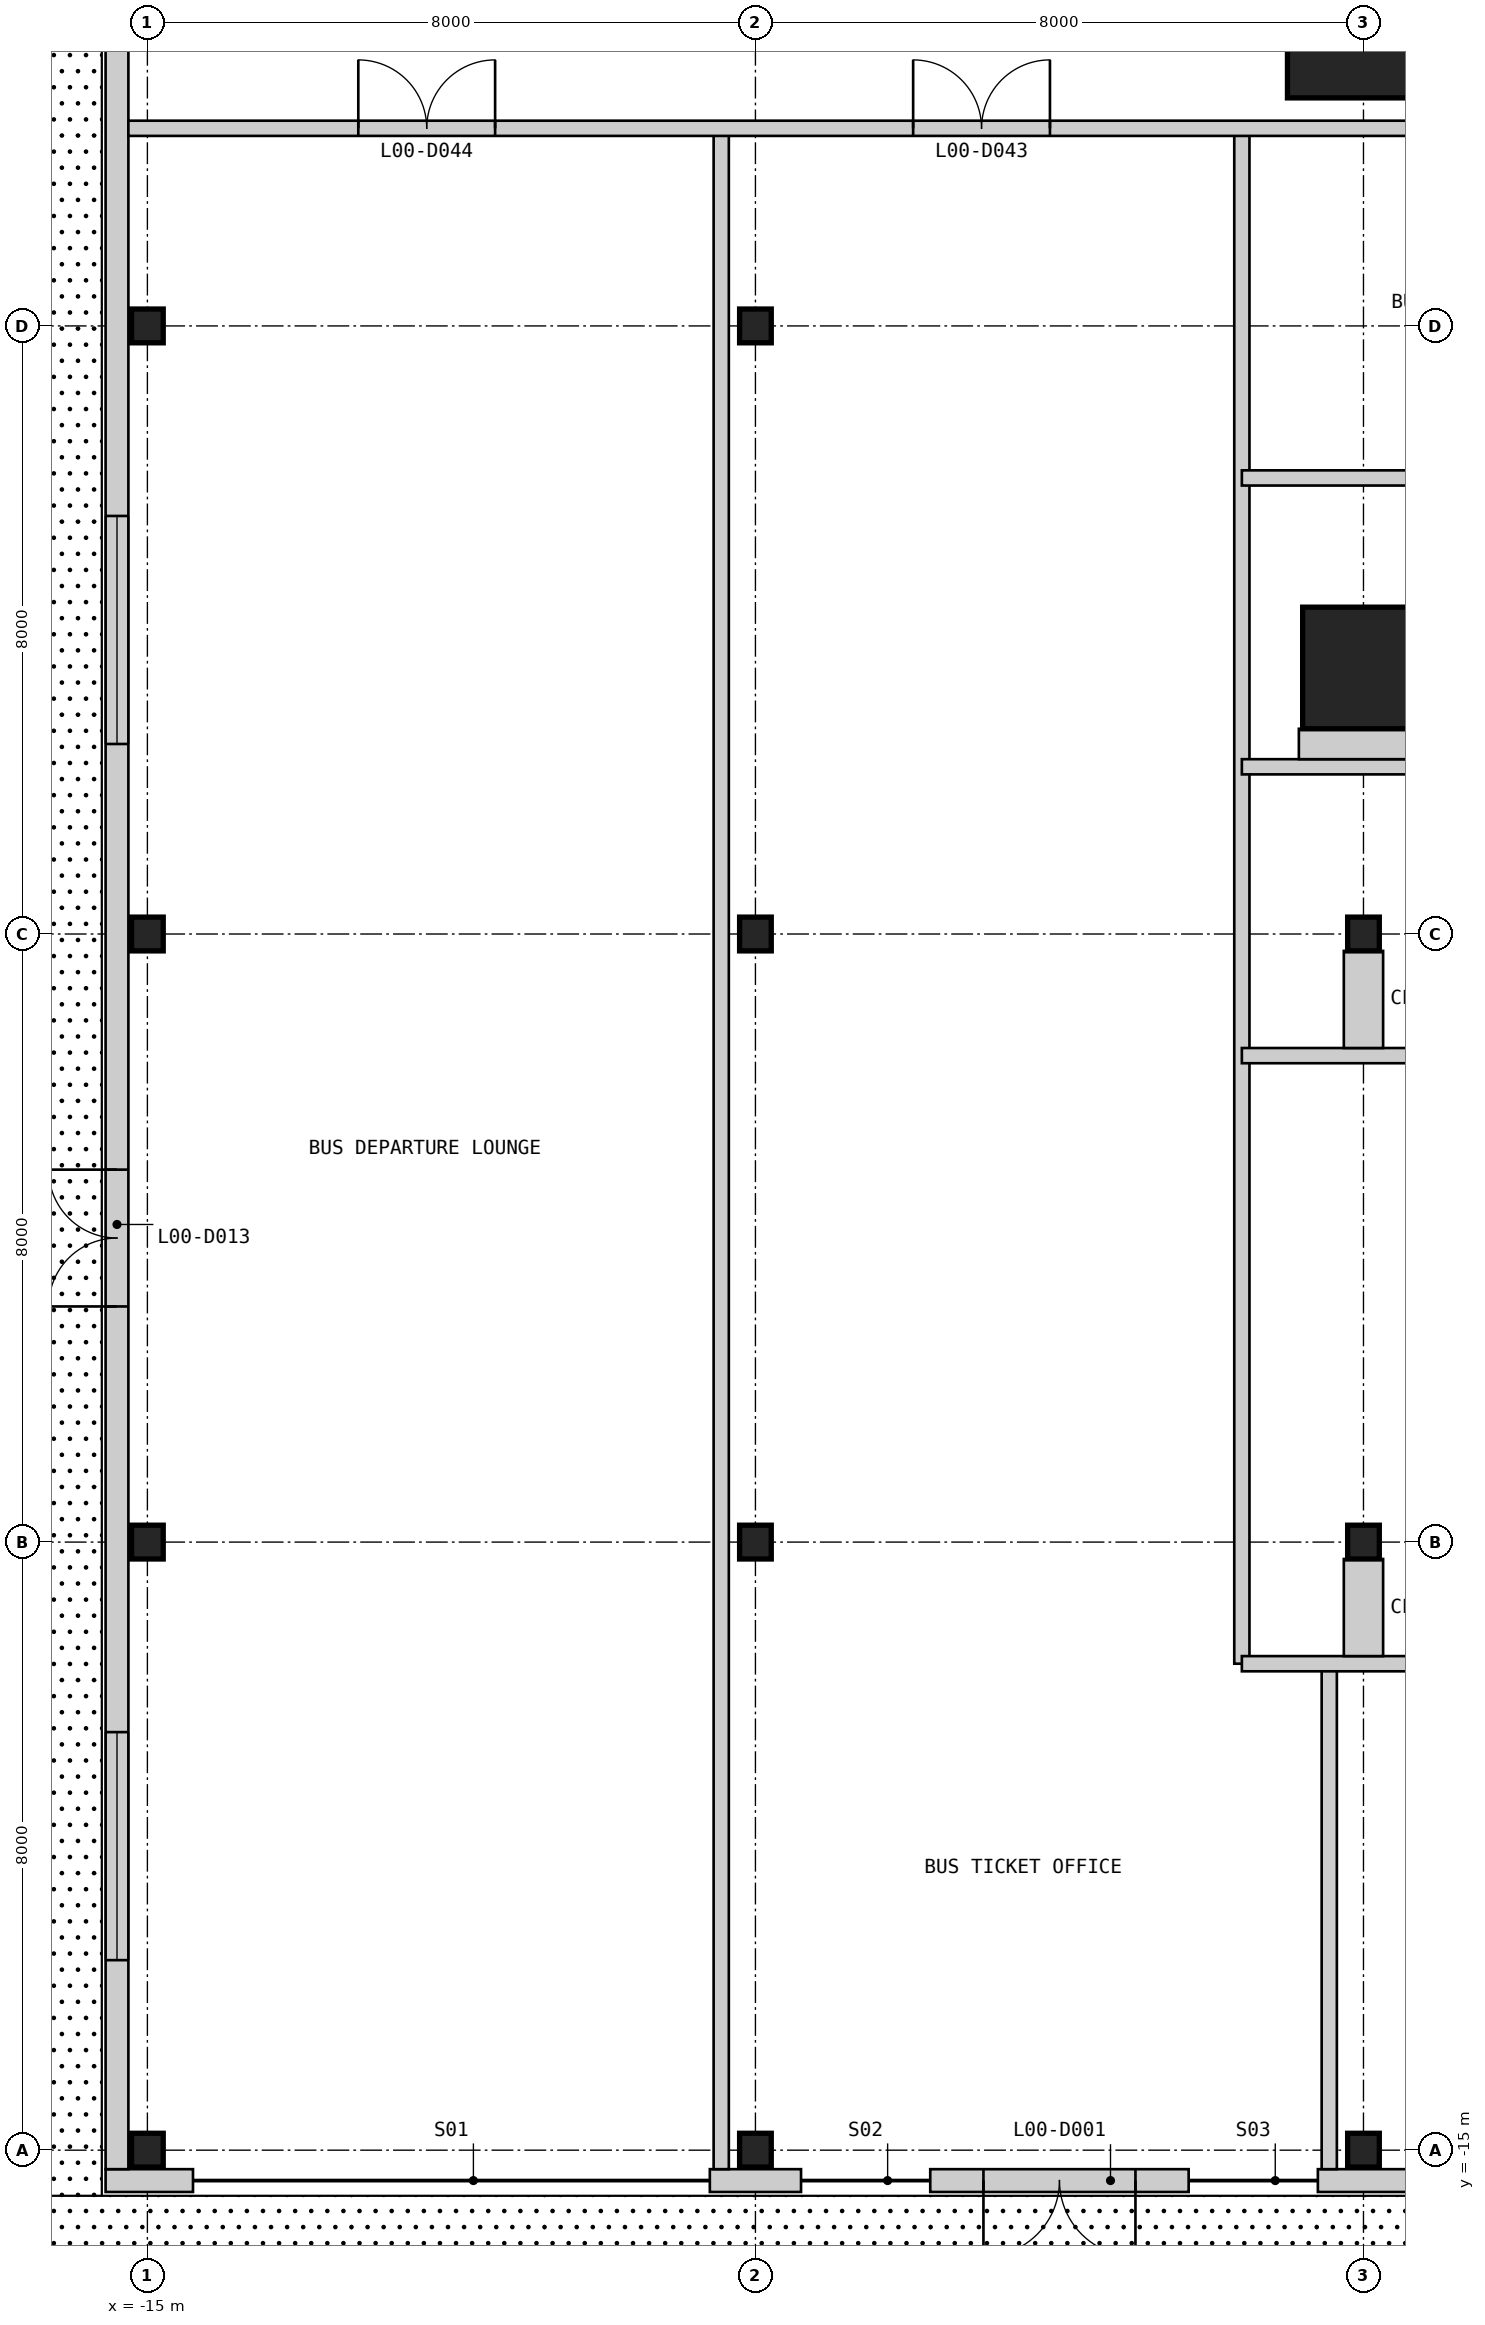
"""IFC4 building model, lengths in metres.
Left out: names, types, materials, properties, quantities, classifications, styles, units other than length and angle.
Written with IfcOpenShell. Run it as: python <this file> out.ifc"""

import sys

from ifc_helpers import new_model, si_unit, direction, frame, frame_2d, origin, origin_2d, place, context, subcontext, project, spatial, rectangle, i_section, extrude, element, fill, save


model = new_model("IFC4")
c1 = context("Model", 3, precision=1e-05, world=origin(), true_north=direction((0.0, 1.0)))
c2 = subcontext(c1, "Body", "Model", "MODEL_VIEW")
j1 = project(units=[si_unit("LENGTHUNIT", "METRE"), si_unit("PLANEANGLEUNIT", "RADIAN")], contexts=[c1])
p1 = place(None, origin())
s1 = spatial("IfcSite", under=j1, at=p1, CompositionType="ELEMENT")
p2 = place(p1, origin())
s2 = spatial("IfcBuilding", under=s1, at=p2, CompositionType="ELEMENT")
p3 = place(p2, origin())
s3 = spatial("IfcBuildingStorey", under=s2, at=p3, CompositionType="ELEMENT", Elevation=0.0)
p4 = place(p3, frame((1.0, 13.0, 0.0), z_axis=(0.0, 0.0, 1.0), x_axis=(1.0, 0.0, 0.0)))
e1 = element("IfcColumn", 1, at=p4, inside=s3, PredefinedType="COLUMN", context=c2, shape_type="SweptSolid", body=[
    extrude(rectangle(XDim=2.0, YDim=2.0, at=origin_2d()), origin(), (0.0, 0.0, 1.0), 7.0),
])
p5 = place(p3, frame((1.0, 4.5, 0.0), z_axis=(0.0, 0.0, 1.0), x_axis=(1.0, 0.0, 0.0)))
e2 = element("IfcColumn", 2, at=p5, inside=s3, PredefinedType="COLUMN", context=c2, shape_type="SweptSolid", body=[
    extrude(rectangle(XDim=1.6, YDim=1.6, at=origin_2d()), origin(), (0.0, 0.0, 1.0), 7.0),
])
for number, where, z_axis, x_axis in (
    (3, (-15.0, -15.0, -0.3), (0.0, 0.0, 1.0), (1.0, 0.0, 0.0)),
    (4, (-15.0, -7.0, -0.3), (0.0, 0.0, 1.0), (1.0, 0.0, 0.0)),
    (5, (-15.0, 1.0, -0.3), (0.0, 0.0, 1.0), (1.0, 0.0, 0.0)),
    (6, (-15.0, 9.0, -0.3), (0.0, 0.0, 1.0), (1.0, 0.0, 0.0)),
    (7, (-7.0, -15.0, -0.3), (0.0, 0.0, 1.0), (1.0, 0.0, 0.0)),
):
    element("IfcColumn", number, at=place(p3, frame(where, z_axis=z_axis, x_axis=x_axis)), inside=s3, PredefinedType="COLUMN", context=c2, shape_type="SweptSolid", body=[
        extrude(i_section(OverallWidth=0.417, OverallDepth=0.445, WebThickness=0.039, FlangeThickness=0.063, at=origin_2d()), origin(), (0.0, 0.0, 1.0), 7.3),
    ])
for number, where, z_axis, x_axis in (
    (8, (-7.0, -7.0, 0.0), (0.0, 0.0, 1.0), (1.0, 0.0, 0.0)),
    (9, (-7.0, 1.0, 0.0), (0.0, 0.0, 1.0), (1.0, 0.0, 0.0)),
    (10, (-7.0, 9.0, 0.0), (0.0, 0.0, 1.0), (1.0, 0.0, 0.0)),
):
    element("IfcColumn", number, at=place(p3, frame(where, z_axis=z_axis, x_axis=x_axis)), inside=s3, PredefinedType="COLUMN", context=c2, shape_type="SweptSolid", body=[
        extrude(i_section(OverallWidth=0.417, OverallDepth=0.445, WebThickness=0.039, FlangeThickness=0.063, at=origin_2d()), origin(), (0.0, 0.0, 1.0), 7.0),
    ])
p6 = place(p3, frame((1.0, -15.0, -0.3), z_axis=(0.0, 0.0, 1.0), x_axis=(1.0, 0.0, 0.0)))
e11 = element("IfcColumn", 11, at=p6, inside=s3, PredefinedType="COLUMN", context=c2, shape_type="SweptSolid", body=[
    extrude(i_section(OverallWidth=0.417, OverallDepth=0.445, WebThickness=0.039, FlangeThickness=0.063, at=origin_2d()), origin(), (0.0, 0.0, 1.0), 7.3),
])
for number, where, z_axis, x_axis in (
    (12, (1.0, -7.0, 0.0), (0.0, 0.0, 1.0), (1.0, 0.0, 0.0)),
    (13, (1.0, 1.0, 0.0), (0.0, 0.0, 1.0), (1.0, 0.0, 0.0)),
):
    element("IfcColumn", number, at=place(p3, frame(where, z_axis=z_axis, x_axis=x_axis)), inside=s3, PredefinedType="COLUMN", context=c2, shape_type="SweptSolid", body=[
        extrude(i_section(OverallWidth=0.417, OverallDepth=0.445, WebThickness=0.039, FlangeThickness=0.063, at=origin_2d()), origin(), (0.0, 0.0, 1.0), 7.0),
    ])
p7 = place(p3, frame((-15.55, -15.4, 0.0), z_axis=(0.0, 0.0, 1.0), x_axis=(1.0, 0.0, 0.0)))
e14 = element("IfcWall", 14, at=p7, inside=s3, PredefinedType="SOLIDWALL", context=c2, shape_type="SweptSolid", body=[
    extrude(rectangle(XDim=1.15, YDim=0.3, at=frame_2d((0.575, 0.0))), origin(), (0.0, 0.0, 1.0), 6.7),
])
p8 = place(p3, frame((-7.6, -15.4, 0.0), z_axis=(0.0, 0.0, 1.0), x_axis=(1.0, 0.0, 0.0)))
e15 = element("IfcWall", 15, at=p8, inside=s3, PredefinedType="SOLIDWALL", context=c2, shape_type="SweptSolid", body=[
    extrude(rectangle(XDim=1.2, YDim=0.3, at=frame_2d((0.6, 0.0))), origin(), (0.0, 0.0, 1.0), 6.7),
])
p9 = place(p3, frame((-4.7, -15.4, 0.0), z_axis=(0.0, 0.0, 1.0), x_axis=(1.0, 0.0, 0.0)))
e16 = element("IfcWall", 16, at=p9, inside=s3, PredefinedType="SOLIDWALL", context=c2, shape_type="SweptSolid", body=[
    extrude(rectangle(XDim=3.4, YDim=0.3, at=frame_2d((1.7, 0.0))), origin(), (0.0, 0.0, 1.0), 6.7),
])
p10 = place(p9, frame((0.7, 0.0, 0.0)))
e17 = element("IfcOpeningElement", 17, at=p10, cuts=e16, PredefinedType="OPENING", context=c2, shape_type="SweptSolid", body=[
    extrude(rectangle(XDim=2.0, YDim=3.0, at=frame_2d((1.0, 1.5))), frame((0.0, 0.16, 0.0), z_axis=(0.0, -1.0, 0.0), x_axis=(1.0, 0.0, 0.0)), (0.0, 0.0, 1.0), 0.32),
])
p11 = place(p3, frame((0.4, -15.4, 0.0), z_axis=(0.0, 0.0, 1.0), x_axis=(1.0, 0.0, 0.0)))
e18 = element("IfcWall", 18, at=p11, inside=s3, PredefinedType="SOLIDWALL", context=c2, shape_type="SweptSolid", body=[
    extrude(rectangle(XDim=1.2, YDim=0.3, at=frame_2d((0.6, 0.0))), origin(), (0.0, 0.0, 1.0), 6.7),
])
p12 = place(p3, frame((-15.4, 65.25, 0.0), z_axis=(0.0, 0.0, 1.0), x_axis=(0.0, -1.0, 0.0)))
e19 = element("IfcWall", 19, at=p12, inside=s3, PredefinedType="SOLIDWALL", context=c2, shape_type="SweptSolid", body=[
    extrude(rectangle(XDim=80.5, YDim=0.3, at=frame_2d((40.25, 0.0))), origin(), (0.0, 0.0, 1.0), 6.7),
])
p13 = place(p12, frame((67.35, 0.0, 0.0)))
e20 = element("IfcOpeningElement", 20, at=p13, cuts=e19, PredefinedType="OPENING", context=c2, shape_type="SweptSolid", body=[
    extrude(rectangle(XDim=1.8, YDim=2.4, at=frame_2d((0.9, 1.2))), frame((0.0, 0.16, 0.0), z_axis=(0.0, -1.0, 0.0), x_axis=(1.0, 0.0, 0.0)), (0.0, 0.0, 1.0), 0.32),
])
p14 = place(p12, frame((45.35, 0.0, 0.0)))
e21 = element("IfcOpeningElement", 21, at=p14, cuts=e19, PredefinedType="OPENING", context=c2, shape_type="SweptSolid", body=[
    extrude(rectangle(XDim=1.8, YDim=2.4, at=frame_2d((0.9, 1.2))), frame((0.0, 0.16, 0.0), z_axis=(0.0, -1.0, 0.0), x_axis=(1.0, 0.0, 0.0)), (0.0, 0.0, 1.0), 0.32),
])
p15 = place(p12, frame((33.35, 0.0, 0.0)))
e22 = element("IfcOpeningElement", 22, at=p15, cuts=e19, PredefinedType="OPENING", context=c2, shape_type="SweptSolid", body=[
    extrude(rectangle(XDim=1.8, YDim=2.4, at=frame_2d((0.9, 1.2))), frame((0.0, 0.16, 0.0), z_axis=(0.0, -1.0, 0.0), x_axis=(1.0, 0.0, 0.0)), (0.0, 0.0, 1.0), 0.32),
])
p16 = place(p12, frame((11.35, 0.0, 0.0)))
e23 = element("IfcOpeningElement", 23, at=p16, cuts=e19, PredefinedType="OPENING", context=c2, shape_type="SweptSolid", body=[
    extrude(rectangle(XDim=1.8, YDim=2.4, at=frame_2d((0.9, 1.2))), frame((0.0, 0.16, 0.0), z_axis=(0.0, -1.0, 0.0), x_axis=(1.0, 0.0, 0.0)), (0.0, 0.0, 1.0), 0.32),
])
p17 = place(p12, frame((74.75, 0.0, 0.9)))
e24 = element("IfcOpeningElement", 24, at=p17, cuts=e19, PredefinedType="OPENING", context=c2, shape_type="SweptSolid", body=[
    extrude(rectangle(XDim=3.0, YDim=2.4, at=frame_2d((1.5, 1.2))), frame((0.0, 0.16, 0.0), z_axis=(0.0, -1.0, 0.0), x_axis=(1.0, 0.0, 0.0)), (0.0, 0.0, 1.0), 0.32),
])
p18 = place(p12, frame((58.75, 0.0, 0.9)))
e25 = element("IfcOpeningElement", 25, at=p18, cuts=e19, PredefinedType="OPENING", context=c2, shape_type="SweptSolid", body=[
    extrude(rectangle(XDim=3.0, YDim=2.4, at=frame_2d((1.5, 1.2))), frame((0.0, 0.16, 0.0), z_axis=(0.0, -1.0, 0.0), x_axis=(1.0, 0.0, 0.0)), (0.0, 0.0, 1.0), 0.32),
])
p19 = place(p12, frame((24.25, 0.0, 0.9)))
e26 = element("IfcOpeningElement", 26, at=p19, cuts=e19, PredefinedType="OPENING", context=c2, shape_type="SweptSolid", body=[
    extrude(rectangle(XDim=3.0, YDim=2.4, at=frame_2d((1.5, 1.2))), frame((0.0, 0.16, 0.0), z_axis=(0.0, -1.0, 0.0), x_axis=(1.0, 0.0, 0.0)), (0.0, 0.0, 1.0), 0.32),
])
p20 = place(p12, frame((18.25, 0.0, 0.9)))
e27 = element("IfcOpeningElement", 27, at=p20, cuts=e19, PredefinedType="OPENING", context=c2, shape_type="SweptSolid", body=[
    extrude(rectangle(XDim=3.0, YDim=2.4, at=frame_2d((1.5, 1.2))), frame((0.0, 0.16, 0.0), z_axis=(0.0, -1.0, 0.0), x_axis=(1.0, 0.0, 0.0)), (0.0, 0.0, 1.0), 0.32),
])
p21 = place(p12, frame((2.75, 0.0, 0.9)))
e28 = element("IfcOpeningElement", 28, at=p21, cuts=e19, PredefinedType="OPENING", context=c2, shape_type="SweptSolid", body=[
    extrude(rectangle(XDim=3.0, YDim=2.4, at=frame_2d((1.5, 1.2))), frame((0.0, 0.16, 0.0), z_axis=(0.0, -1.0, 0.0), x_axis=(1.0, 0.0, 0.0)), (0.0, 0.0, 1.0), 0.32),
])
p22 = place(p3, frame((-7.45, -15.25, 0.0), z_axis=(0.0, 0.0, 1.0), x_axis=(0.0, 1.0, 0.0)))
e29 = element("IfcWall", 29, at=p22, inside=s3, PredefinedType="PARTITIONING", context=c2, shape_type="SweptSolid", body=[
    extrude(rectangle(XDim=26.85, YDim=0.2, at=frame_2d((13.425, 0.0))), origin(), (0.0, 0.0, 1.0), 6.7),
])
p23 = place(p3, frame((-0.6, -8.6, 0.0), z_axis=(0.0, 0.0, 1.0), x_axis=(0.0, 1.0, 0.0)))
e30 = element("IfcWall", 30, at=p23, inside=s3, PredefinedType="PARTITIONING", context=c2, shape_type="SweptSolid", body=[
    extrude(rectangle(XDim=20.2, YDim=0.2, at=frame_2d((10.1, 0.0))), origin(), (0.0, 0.0, 1.0), 6.7),
])
p24 = place(p3, frame((0.55, -15.25, 0.0), z_axis=(0.0, 0.0, 1.0), x_axis=(0.0, 1.0, 0.0)))
e31 = element("IfcWall", 31, at=p24, inside=s3, PredefinedType="PARTITIONING", context=c2, shape_type="SweptSolid", body=[
    extrude(rectangle(XDim=6.65, YDim=0.2, at=frame_2d((3.325, 0.0))), origin(), (0.0, 0.0, 1.0), 6.7),
])
p25 = place(p3, frame((-0.6, -8.6, 0.0), z_axis=(0.0, 0.0, 1.0), x_axis=(1.0, 0.0, 0.0)))
e32 = element("IfcWall", 32, at=p25, inside=s3, PredefinedType="PARTITIONING", context=c2, shape_type="SweptSolid", body=[
    extrude(rectangle(XDim=13.15, YDim=0.2, at=frame_2d((6.575, 0.0))), origin(), (0.0, 0.0, 1.0), 6.7),
])
for number, where, z_axis, x_axis in (
    (33, (-0.6, -0.6, 0.0), (0.0, 0.0, 1.0), (1.0, 0.0, 0.0)),
    (34, (-0.6, 3.2, 0.0), (0.0, 0.0, 1.0), (1.0, 0.0, 0.0)),
):
    element("IfcWall", number, at=place(p3, frame(where, z_axis=z_axis, x_axis=x_axis)), inside=s3, PredefinedType="PARTITIONING", context=c2, shape_type="SweptSolid", body=[
        extrude(rectangle(XDim=12.2, YDim=0.2, at=frame_2d((6.1, 0.0))), origin(), (0.0, 0.0, 1.0), 6.7),
    ])
p26 = place(p3, frame((-0.6, 7.0, 0.0), z_axis=(0.0, 0.0, 1.0), x_axis=(1.0, 0.0, 0.0)))
e35 = element("IfcWall", 35, at=p26, inside=s3, PredefinedType="PARTITIONING", context=c2, shape_type="SweptSolid", body=[
    extrude(rectangle(XDim=17.0, YDim=0.2, at=frame_2d((8.5, 0.0))), origin(), (0.0, 0.0, 1.0), 6.7),
])
p27 = place(p26, frame((14.125, 0.0, 0.0)))
e36 = element("IfcOpeningElement", 36, at=p27, cuts=e35, PredefinedType="OPENING", context=c2, shape_type="SweptSolid", body=[
    extrude(rectangle(XDim=0.9, YDim=2.2, at=frame_2d((0.45, 1.1))), frame((0.0, 0.11, 0.0), z_axis=(0.0, -1.0, 0.0), x_axis=(1.0, 0.0, 0.0)), (0.0, 0.0, 1.0), 0.22),
])
p28 = place(p3, frame((-15.25, 11.6, 0.0), z_axis=(0.0, 0.0, 1.0), x_axis=(1.0, 0.0, 0.0)))
e37 = element("IfcWall", 37, at=p28, inside=s3, PredefinedType="PARTITIONING", context=c2, shape_type="SweptSolid", body=[
    extrude(rectangle(XDim=22.25, YDim=0.2, at=frame_2d((11.125, 0.0))), origin(), (0.0, 0.0, 1.0), 6.7),
])
p29 = place(p28, frame((10.325, 0.0, 0.0)))
e38 = element("IfcOpeningElement", 38, at=p29, cuts=e37, PredefinedType="OPENING", context=c2, shape_type="SweptSolid", body=[
    extrude(rectangle(XDim=1.8, YDim=2.4, at=frame_2d((0.9, 1.2))), frame((0.0, 0.11, 0.0), z_axis=(0.0, -1.0, 0.0), x_axis=(1.0, 0.0, 0.0)), (0.0, 0.0, 1.0), 0.22),
])
p30 = place(p28, frame((3.025, 0.0, 0.0)))
e39 = element("IfcOpeningElement", 39, at=p30, cuts=e37, PredefinedType="OPENING", context=c2, shape_type="SweptSolid", body=[
    extrude(rectangle(XDim=1.8, YDim=2.4, at=frame_2d((0.9, 1.2))), frame((0.0, 0.11, 0.0), z_axis=(0.0, -1.0, 0.0), x_axis=(1.0, 0.0, 0.0)), (0.0, 0.0, 1.0), 0.22),
])
p31 = place(p28, frame((17.975, 0.0, 0.0)))
e40 = element("IfcOpeningElement", 40, at=p31, cuts=e37, PredefinedType="OPENING", context=c2, shape_type="SweptSolid", body=[
    extrude(rectangle(XDim=0.9, YDim=2.2, at=frame_2d((0.45, 1.1))), frame((0.0, 0.11, 0.0), z_axis=(0.0, -1.0, 0.0), x_axis=(1.0, 0.0, 0.0)), (0.0, 0.0, 1.0), 0.22),
])
for number, where, z_axis, x_axis in (
    (41, (1.0, -8.5, 0.0), (0.0, 0.0, 1.0), (0.0, 1.0, 0.0)),
    (42, (1.0, -0.5, 0.0), (0.0, 0.0, 1.0), (0.0, 1.0, 0.0)),
):
    element("IfcWall", number, at=place(p3, frame(where, z_axis=z_axis, x_axis=x_axis)), inside=s3, PredefinedType="PARTITIONING", context=c2, shape_type="SweptSolid", body=[
        extrude(rectangle(XDim=1.278, YDim=0.517, at=frame_2d((0.639, 0.0))), origin(), (0.0, 0.0, 1.0), 5.954),
    ])
p32 = place(p3, frame((1.0, 3.3, 0.0), z_axis=(0.0, 0.0, 1.0), x_axis=(0.0, 1.0, 0.0)))
e43 = element("IfcWall", 43, at=p32, inside=s3, PredefinedType="PARTITIONING", context=c2, shape_type="SweptSolid", body=[
    extrude(rectangle(XDim=0.4, YDim=1.7, at=frame_2d((0.2, 0.0))), origin(), (0.0, 0.0, 1.0), 6.7),
])
p33 = place(p10, frame((2.0, 0.0, 0.0), z_axis=(0.0, 0.0, 1.0), x_axis=(-1.0, 0.0, 0.0)))
e44 = element("IfcDoor", 44, at=p33, inside=s3, OperationType="DOUBLE_DOOR_SINGLE_SWING", PredefinedType="DOOR", context=c2, shape_type="SweptSolid", body=[
    extrude(rectangle(XDim=2.0, YDim=3.0, at=frame_2d((1.0, 1.5))), frame((0.0, 0.025, 0.0), z_axis=(0.0, -1.0, 0.0), x_axis=(1.0, 0.0, 0.0)), (0.0, 0.0, 1.0), 0.05),
])
fill(e17, e44)
p34 = place(p13, frame((1.8, 0.0, 0.0), z_axis=(0.0, 0.0, 1.0), x_axis=(-1.0, 0.0, 0.0)))
e45 = element("IfcDoor", 45, at=p34, inside=s3, OperationType="DOUBLE_DOOR_SINGLE_SWING", PredefinedType="DOOR", context=c2, shape_type="SweptSolid", body=[
    extrude(rectangle(XDim=1.8, YDim=2.4, at=frame_2d((0.9, 1.2))), frame((0.0, 0.025, 0.0), z_axis=(0.0, -1.0, 0.0), x_axis=(1.0, 0.0, 0.0)), (0.0, 0.0, 1.0), 0.05),
])
fill(e20, e45)
p35 = place(p17, origin())
e46 = element("IfcWindow", 46, at=p35, inside=s3, PartitioningType="SINGLE_PANEL", PredefinedType="WINDOW", context=c2, shape_type="SweptSolid", body=[
    extrude(rectangle(XDim=3.0, YDim=2.4, at=frame_2d((1.5, 1.2))), frame((0.0, 0.03, 0.0), z_axis=(0.0, -1.0, 0.0), x_axis=(1.0, 0.0, 0.0)), (0.0, 0.0, 1.0), 0.06),
])
fill(e24, e46)
p36 = place(p18, origin())
e47 = element("IfcWindow", 47, at=p36, inside=s3, PartitioningType="SINGLE_PANEL", PredefinedType="WINDOW", context=c2, shape_type="SweptSolid", body=[
    extrude(rectangle(XDim=3.0, YDim=2.4, at=frame_2d((1.5, 1.2))), frame((0.0, 0.03, 0.0), z_axis=(0.0, -1.0, 0.0), x_axis=(1.0, 0.0, 0.0)), (0.0, 0.0, 1.0), 0.06),
])
fill(e25, e47)
p37 = place(p29, origin())
e48 = element("IfcDoor", 48, at=p37, inside=s3, OperationType="DOUBLE_DOOR_SINGLE_SWING", PredefinedType="DOOR", context=c2, shape_type="SweptSolid", body=[
    extrude(rectangle(XDim=1.8, YDim=2.4, at=frame_2d((0.9, 1.2))), frame((0.0, 0.025, 0.0), z_axis=(0.0, -1.0, 0.0), x_axis=(1.0, 0.0, 0.0)), (0.0, 0.0, 1.0), 0.05),
])
fill(e38, e48)
p38 = place(p30, origin())
e49 = element("IfcDoor", 49, at=p38, inside=s3, OperationType="DOUBLE_DOOR_SINGLE_SWING", PredefinedType="DOOR", context=c2, shape_type="SweptSolid", body=[
    extrude(rectangle(XDim=1.8, YDim=2.4, at=frame_2d((0.9, 1.2))), frame((0.0, 0.025, 0.0), z_axis=(0.0, -1.0, 0.0), x_axis=(1.0, 0.0, 0.0)), (0.0, 0.0, 1.0), 0.05),
])
fill(e39, e49)
save(model, sys.argv[1])
